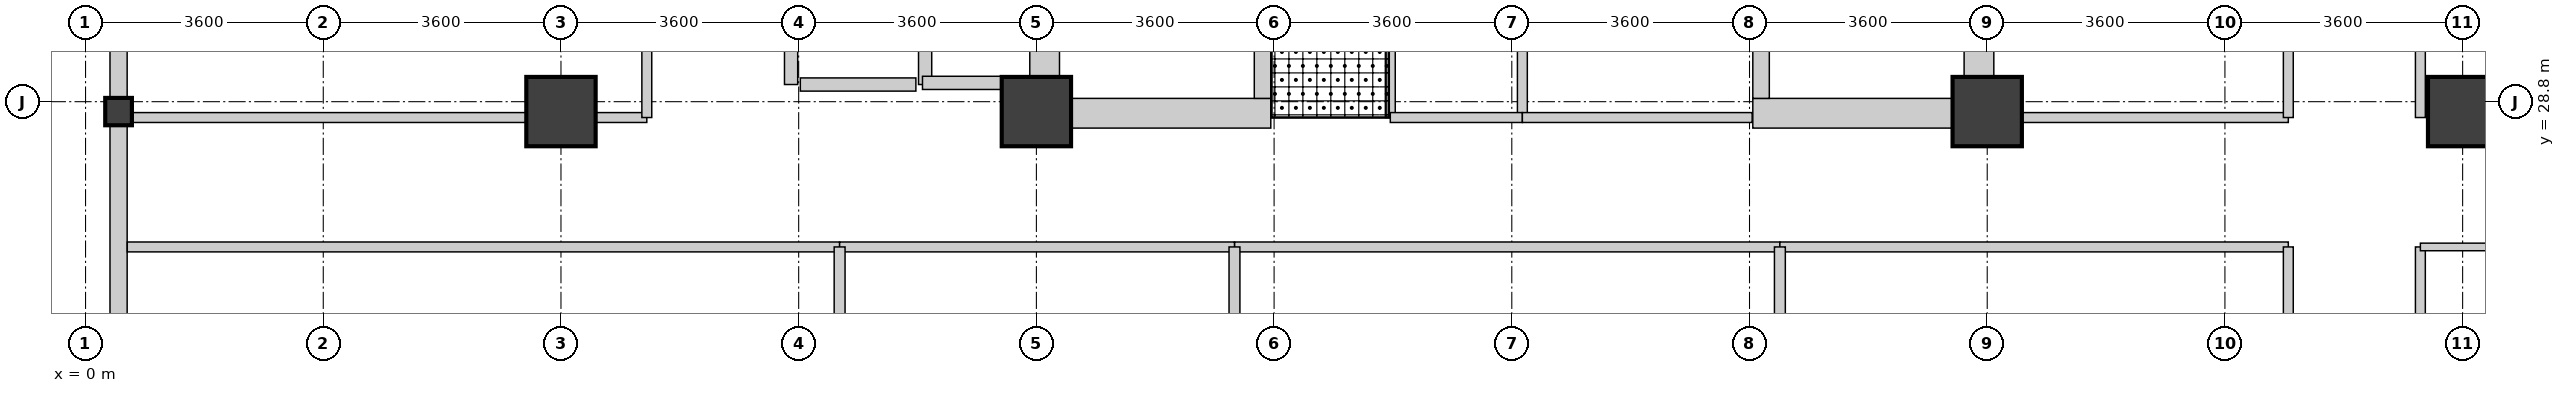
"""IFC4 building model, lengths in metres.
Left out: names, types, materials, properties, quantities, classifications, styles, units other than length and angle.
Written with IfcOpenShell. Run it as: python <this file> out.ifc"""

import sys

from ifc_helpers import new_model, si_unit, direction, frame, frame_2d, origin, origin_2d, place, context, subcontext, project, spatial, rectangle, i_section, extrude, source, transform, mapped, element, fill, save


model = new_model("IFC4")
c1 = context("Model", 3, precision=1e-05, world=origin(), true_north=direction((0.0, 1.0)))
c2 = subcontext(c1, "Body", "Model", "MODEL_VIEW")
j1 = project(units=[si_unit("LENGTHUNIT", "METRE"), si_unit("PLANEANGLEUNIT", "RADIAN")], contexts=[c1])
p1 = place(None, origin())
s1 = spatial("IfcSite", under=j1, at=p1, CompositionType="ELEMENT")
p2 = place(p1, origin())
s2 = spatial("IfcBuilding", under=s1, at=p2, CompositionType="ELEMENT")
p3 = place(p2, frame((0.0, 0.0, 135.6)))
s3 = spatial("IfcBuildingStorey", under=s2, at=p3, CompositionType="ELEMENT", Elevation=135.6)
for number, where, z_axis, x_axis in (
    (1, (14.525, 28.4, 0.0), (0.0, 0.0, 1.0), (0.0, 1.0, 0.0)),
    (2, (28.675, 28.4, 0.0), (0.0, 0.0, 1.0), (0.0, 1.0, 0.0)),
):
    element("IfcWall", number, at=place(p3, frame(where, z_axis=z_axis, x_axis=x_axis)), inside=s3, PredefinedType="SHEAR", context=c2, shape_type="SweptSolid", body=[
        extrude(rectangle(XDim=7.9, YDim=0.45, at=frame_2d((3.95, 0.0))), origin(), (0.0, 0.0, 1.0), 4.36),
    ])
for number, where, z_axis, x_axis in (
    (3, (14.75, 28.625, 0.0), (0.0, 0.0, 1.0), (1.0, 0.0, 0.0)),
    (4, (25.25, 28.625, 0.0), (0.0, 0.0, 1.0), (1.0, 0.0, 0.0)),
):
    element("IfcWall", number, at=place(p3, frame(where, z_axis=z_axis, x_axis=x_axis)), inside=s3, PredefinedType="SHEAR", context=c2, shape_type="SweptSolid", body=[
        extrude(rectangle(XDim=3.2, YDim=0.45, at=frame_2d((1.6, 0.0))), origin(), (0.0, 0.0, 1.0), 4.36),
    ])
p4 = place(p3, frame((17.825, 28.85, 0.0), z_axis=(0.0, 0.0, 1.0), x_axis=(0.0, 1.0, 0.0)))
e5 = element("IfcWall", 5, at=p4, inside=s3, PredefinedType="SHEAR", context=c2, shape_type="SweptSolid", body=[
    extrude(rectangle(XDim=7.0, YDim=0.25, at=frame_2d((3.5, 0.0))), origin(), (0.0, 0.0, 1.0), 4.36),
])
p5 = place(p4, frame((0.15, 0.0, 0.0)))
e6 = element("IfcOpeningElement", 6, at=p5, cuts=e5, PredefinedType="OPENING", context=c2, shape_type="SweptSolid", body=[
    extrude(rectangle(XDim=1.1, YDim=2.08, at=frame_2d((0.55, 1.04))), frame((0.0, 0.135, 0.0), z_axis=(0.0, -1.0, 0.0), x_axis=(1.0, 0.0, 0.0)), (0.0, 0.0, 1.0), 0.27),
])
p6 = place(p3, frame((25.375, 28.85, 0.0), z_axis=(0.0, 0.0, 1.0), x_axis=(0.0, 1.0, 0.0)))
e7 = element("IfcWall", 7, at=p6, inside=s3, PredefinedType="SHEAR", context=c2, shape_type="SweptSolid", body=[
    extrude(rectangle(XDim=7.0, YDim=0.25, at=frame_2d((3.5, 0.0))), origin(), (0.0, 0.0, 1.0), 4.36),
])
p7 = place(p6, frame((0.15, 0.0, 0.0)))
e8 = element("IfcOpeningElement", 8, at=p7, cuts=e7, PredefinedType="OPENING", context=c2, shape_type="SweptSolid", body=[
    extrude(rectangle(XDim=1.1, YDim=2.08, at=frame_2d((0.55, 1.04))), frame((0.0, 0.135, 0.0), z_axis=(0.0, -1.0, 0.0), x_axis=(1.0, 0.0, 0.0)), (0.0, 0.0, 1.0), 0.27),
])
m1 = source(origin(), c2, "Body", "SweptSolid", [
    extrude(rectangle(XDim=1.05, YDim=1.05, at=origin_2d()), origin(), (0.0, 0.0, 1.0), 4.6),
])
for number, where, z_axis, x_axis in (
    (9, (7.2, 28.65, 0.0), (0.0, 0.0, 1.0), (1.0, 0.0, 0.0)),
    (10, (14.4, 28.65, 0.0), (0.0, 0.0, 1.0), (1.0, 0.0, 0.0)),
    (11, (28.8, 28.65, 0.0), (0.0, 0.0, 1.0), (1.0, 0.0, 0.0)),
    (12, (36.0, 28.65, 0.0), (0.0, 0.0, 1.0), (1.0, 0.0, 0.0)),
):
    element("IfcColumn", number, at=place(p3, frame(where, z_axis=z_axis, x_axis=x_axis)), inside=s3, PredefinedType="COLUMN", context=c2, shape_type="MappedRepresentation", body=[
        mapped(m1, transform((0.0, 0.0, 0.0), x_axis=(1.0, 0.0, 0.0), y_axis=(0.0, 1.0, 0.0), z_axis=(0.0, 0.0, 1.0), scale=1.0)),
    ])
m2 = source(origin(), c2, "Body", "SweptSolid", [
    extrude(i_section(OverallWidth=0.404, OverallDepth=0.414, WebThickness=0.021, FlangeThickness=0.028, FilletRadius=0.015, at=origin_2d()), origin(), (0.0, 0.0, 1.0), 4.6),
])
p8 = place(p3, frame((0.5, 28.65, 0.0), z_axis=(0.0, 0.0, 1.0), x_axis=(1.0, 0.0, 0.0)))
e13 = element("IfcColumn", 13, at=p8, inside=s3, PredefinedType="COLUMN", context=c2, shape_type="MappedRepresentation", body=[
    mapped(m2, transform((0.0, 0.0, 0.0), x_axis=(1.0, 0.0, 0.0), y_axis=(0.0, 1.0, 0.0), z_axis=(0.0, 0.0, 1.0), scale=1.0)),
])
p9 = place(p3, frame((0.5, 28.858, 0.0), z_axis=(0.0, 0.0, 1.0), x_axis=(0.0, 1.0, 0.0)))
e14 = element("IfcWall", 14, at=p9, inside=s3, PredefinedType="STANDARD", context=c2, shape_type="SweptSolid", body=[
    extrude(rectangle(XDim=7.084, YDim=0.26, at=frame_2d((3.542, 0.0))), origin(), (0.0, 0.0, 1.0), 3.89),
])
p10 = place(p9, frame((0.421, 0.0, 0.85)))
e15 = element("IfcOpeningElement", 15, at=p10, cuts=e14, PredefinedType="OPENING", context=c2, shape_type="SweptSolid", body=[
    extrude(rectangle(XDim=2.7, YDim=2.05, at=frame_2d((1.35, 1.025))), frame((0.0, 0.14, 0.0), z_axis=(0.0, -1.0, 0.0), x_axis=(1.0, 0.0, 0.0)), (0.0, 0.0, 1.0), 0.28),
])
p11 = place(p9, frame((3.963, 0.0, 0.85)))
e16 = element("IfcOpeningElement", 16, at=p11, cuts=e14, PredefinedType="OPENING", context=c2, shape_type="SweptSolid", body=[
    extrude(rectangle(XDim=2.7, YDim=2.05, at=frame_2d((1.35, 1.025))), frame((0.0, 0.14, 0.0), z_axis=(0.0, -1.0, 0.0), x_axis=(1.0, 0.0, 0.0)), (0.0, 0.0, 1.0), 0.28),
])
p12 = place(p3, frame((0.5, 21.47, 0.0), z_axis=(0.0, 0.0, 1.0), x_axis=(0.0, 1.0, 0.0)))
e17 = element("IfcWall", 17, at=p12, inside=s3, PredefinedType="STANDARD", context=c2, shape_type="SweptSolid", body=[
    extrude(rectangle(XDim=6.972, YDim=0.26, at=frame_2d((3.486, 0.0))), origin(), (0.0, 0.0, 1.0), 4.34),
])
p13 = place(p12, frame((0.393, 0.0, 0.85)))
e18 = element("IfcOpeningElement", 18, at=p13, cuts=e17, PredefinedType="OPENING", context=c2, shape_type="SweptSolid", body=[
    extrude(rectangle(XDim=2.7, YDim=2.05, at=frame_2d((1.35, 1.025))), frame((0.0, 0.14, 0.0), z_axis=(0.0, -1.0, 0.0), x_axis=(1.0, 0.0, 0.0)), (0.0, 0.0, 1.0), 0.28),
])
p14 = place(p12, frame((3.569, 0.0, 0.85)))
e19 = element("IfcOpeningElement", 19, at=p14, cuts=e17, PredefinedType="OPENING", context=c2, shape_type="SweptSolid", body=[
    extrude(rectangle(XDim=0.95, YDim=1.75, at=frame_2d((0.475, 0.875))), frame((0.0, 0.14, 0.0), z_axis=(0.0, -1.0, 0.0), x_axis=(1.0, 0.0, 0.0)), (0.0, 0.0, 1.0), 0.28),
])
p15 = place(p3, frame((10.825, 29.06, 0.0), z_axis=(0.0, 0.0, 1.0), x_axis=(1.0, 0.0, 0.0)))
e20 = element("IfcWall", 20, at=p15, inside=s3, PredefinedType="PARTITIONING", context=c2, shape_type="SweptSolid", body=[
    extrude(rectangle(XDim=1.75, YDim=0.2, at=frame_2d((0.875, 0.0))), origin(), (0.0, 0.0, 1.0), 4.34),
])
for number, where, z_axis, x_axis in (
    (21, (10.685, 29.06, 0.0), (0.0, 0.0, 1.0), (0.0, 1.0, 0.0)),
    (22, (12.715, 29.06, 0.0), (0.0, 0.0, 1.0), (0.0, 1.0, 0.0)),
):
    element("IfcWall", number, at=place(p3, frame(where, z_axis=z_axis, x_axis=x_axis)), inside=s3, PredefinedType="PARTITIONING", context=c2, shape_type="SweptSolid", body=[
        extrude(rectangle(XDim=2.28, YDim=0.2, at=frame_2d((1.14, 0.0))), origin(), (0.0, 0.0, 1.0), 4.34),
    ])
p16 = place(p3, frame((12.675, 29.085, 0.0), z_axis=(0.0, 0.0, 1.0), x_axis=(1.0, 0.0, 0.0)))
e23 = element("IfcWall", 23, at=p16, inside=s3, PredefinedType="PARTITIONING", context=c2, shape_type="SweptSolid", body=[
    extrude(rectangle(XDim=1.65, YDim=0.2, at=frame_2d((0.825, 0.0))), origin(), (0.0, 0.0, 1.0), 4.34),
])
p17 = place(p3, frame((0.632, 26.6, 0.0), z_axis=(0.0, 0.0, 1.0), x_axis=(1.0, 0.0, 0.0)))
e24 = element("IfcWall", 24, at=p17, inside=s3, PredefinedType="PARTITIONING", context=c2, shape_type="SweptSolid", body=[
    extrude(rectangle(XDim=10.788, YDim=0.15, at=frame_2d((5.394, 0.0))), origin(), (0.0, 0.0, 1.0), 4.34),
])
p18 = place(p17, frame((4.744, 0.0, 0.0)))
e25 = element("IfcOpeningElement", 25, at=p18, cuts=e24, PredefinedType="OPENING", context=c2, shape_type="SweptSolid", body=[
    extrude(rectangle(XDim=1.3, YDim=2.12, at=frame_2d((0.65, 1.06))), frame((0.0, 0.085, 0.0), z_axis=(0.0, -1.0, 0.0), x_axis=(1.0, 0.0, 0.0)), (0.0, 0.0, 1.0), 0.17),
])
p19 = place(p3, frame((35.36, 16.96, 0.0), z_axis=(0.0, 0.0, 1.0), x_axis=(0.0, 1.0, 0.0)))
e26 = element("IfcWall", 26, at=p19, inside=s3, PredefinedType="PARTITIONING", context=c2, shape_type="SweptSolid", body=[
    extrude(rectangle(XDim=9.64, YDim=0.15, at=frame_2d((4.82, 0.0))), origin(), (0.0, 0.0, 1.0), 4.34),
])
p20 = place(p19, frame((2.435, 0.0, 0.0)))
e27 = element("IfcOpeningElement", 27, at=p20, cuts=e26, PredefinedType="OPENING", context=c2, shape_type="SweptSolid", body=[
    extrude(rectangle(XDim=1.3, YDim=2.12, at=frame_2d((0.65, 1.06))), frame((0.0, 0.085, 0.0), z_axis=(0.0, -1.0, 0.0), x_axis=(1.0, 0.0, 0.0)), (0.0, 0.0, 1.0), 0.17),
])
p21 = place(p3, frame((17.4, 26.6, 0.0), z_axis=(0.0, 0.0, 1.0), x_axis=(1.0, 0.0, 0.0)))
e28 = element("IfcWall", 28, at=p21, inside=s3, PredefinedType="PARTITIONING", context=c2, shape_type="SweptSolid", body=[
    extrude(rectangle(XDim=8.26, YDim=0.15, at=frame_2d((4.13, 0.0))), origin(), (0.0, 0.0, 1.0), 4.34),
])
p22 = place(p21, frame((3.655, 0.0, 0.0)))
e29 = element("IfcOpeningElement", 29, at=p22, cuts=e28, PredefinedType="OPENING", context=c2, shape_type="SweptSolid", body=[
    extrude(rectangle(XDim=0.95, YDim=2.1, at=frame_2d((0.475, 1.05))), frame((0.0, 0.085, 0.0), z_axis=(0.0, -1.0, 0.0), x_axis=(1.0, 0.0, 0.0)), (0.0, 0.0, 1.0), 0.17),
])
p23 = place(p3, frame((0.702, 28.56, 0.0), z_axis=(0.0, 0.0, 1.0), x_axis=(1.0, 0.0, 0.0)))
e30 = element("IfcWall", 30, at=p23, inside=s3, PredefinedType="PARTITIONING", context=c2, shape_type="SweptSolid", body=[
    extrude(rectangle(XDim=5.973, YDim=0.15, at=frame_2d((2.987, 0.0))), origin(), (0.0, 0.0, 1.0), 3.74),
])
p24 = place(p23, frame((2.336, 0.0, 0.0)))
e31 = element("IfcOpeningElement", 31, at=p24, cuts=e30, PredefinedType="OPENING", context=c2, shape_type="SweptSolid", body=[
    extrude(rectangle(XDim=1.3, YDim=2.12, at=frame_2d((0.65, 1.06))), frame((0.0, 0.085, 0.0), z_axis=(0.0, -1.0, 0.0), x_axis=(1.0, 0.0, 0.0)), (0.0, 0.0, 1.0), 0.17),
])
p25 = place(p3, frame((7.725, 28.56, 0.0), z_axis=(0.0, 0.0, 1.0), x_axis=(1.0, 0.0, 0.0)))
e32 = element("IfcWall", 32, at=p25, inside=s3, PredefinedType="PARTITIONING", context=c2, shape_type="SweptSolid", body=[
    extrude(rectangle(XDim=0.775, YDim=0.15, at=frame_2d((0.387, 0.0))), origin(), (0.0, 0.0, 1.0), 3.74),
])
p26 = place(p3, frame((25.66, 26.6, 0.0), z_axis=(0.0, 0.0, 1.0), x_axis=(1.0, 0.0, 0.0)))
e33 = element("IfcWall", 33, at=p26, inside=s3, PredefinedType="PARTITIONING", context=c2, shape_type="SweptSolid", body=[
    extrude(rectangle(XDim=7.7, YDim=0.15, at=frame_2d((3.85, 0.0))), origin(), (0.0, 0.0, 1.0), 4.34),
])
p27 = place(p26, frame((3.2, 0.0, 0.0)))
e34 = element("IfcOpeningElement", 34, at=p27, cuts=e33, PredefinedType="OPENING", context=c2, shape_type="SweptSolid", body=[
    extrude(rectangle(XDim=1.3, YDim=2.12, at=frame_2d((0.65, 1.06))), frame((0.0, 0.085, 0.0), z_axis=(0.0, -1.0, 0.0), x_axis=(1.0, 0.0, 0.0)), (0.0, 0.0, 1.0), 0.17),
])
p28 = place(p3, frame((35.36, 28.56, 0.0), z_axis=(0.0, 0.0, 1.0), x_axis=(0.0, 1.0, 0.0)))
e35 = element("IfcWall", 35, at=p28, inside=s3, PredefinedType="PARTITIONING", context=c2, shape_type="SweptSolid", body=[
    extrude(rectangle(XDim=7.68, YDim=0.15, at=frame_2d((3.84, 0.0))), origin(), (0.0, 0.0, 1.0), 4.34),
])
p29 = place(p28, frame((3.19, 0.0, 0.0)))
e36 = element("IfcOpeningElement", 36, at=p29, cuts=e35, PredefinedType="OPENING", context=c2, shape_type="SweptSolid", body=[
    extrude(rectangle(XDim=1.3, YDim=2.12, at=frame_2d((0.65, 1.06))), frame((0.0, 0.085, 0.0), z_axis=(0.0, -1.0, 0.0), x_axis=(1.0, 0.0, 0.0)), (0.0, 0.0, 1.0), 0.17),
])
p30 = place(p3, frame((11.42, 26.6, 0.0), z_axis=(0.0, 0.0, 1.0), x_axis=(1.0, 0.0, 0.0)))
e37 = element("IfcWall", 37, at=p30, inside=s3, PredefinedType="PARTITIONING", context=c2, shape_type="SweptSolid", body=[
    extrude(rectangle(XDim=5.98, YDim=0.15, at=frame_2d((2.99, 0.0))), origin(), (0.0, 0.0, 1.0), 4.34),
])
p31 = place(p30, frame((2.34, 0.0, 0.0)))
e38 = element("IfcOpeningElement", 38, at=p31, cuts=e37, PredefinedType="OPENING", context=c2, shape_type="SweptSolid", body=[
    extrude(rectangle(XDim=1.3, YDim=2.12, at=frame_2d((0.65, 1.06))), frame((0.0, 0.085, 0.0), z_axis=(0.0, -1.0, 0.0), x_axis=(1.0, 0.0, 0.0)), (0.0, 0.0, 1.0), 0.17),
])
p32 = place(p3, frame((33.36, 21.6, 0.0), z_axis=(0.0, 0.0, 1.0), x_axis=(0.0, 1.0, 0.0)))
e39 = element("IfcWall", 39, at=p32, inside=s3, PredefinedType="PARTITIONING", context=c2, shape_type="SweptSolid", body=[
    extrude(rectangle(XDim=5.0, YDim=0.15, at=frame_2d((2.5, 0.0))), origin(), (0.0, 0.0, 1.0), 4.34),
])
p33 = place(p3, frame((29.325, 28.56, 0.0), z_axis=(0.0, 0.0, 1.0), x_axis=(1.0, 0.0, 0.0)))
e40 = element("IfcWall", 40, at=p33, inside=s3, PredefinedType="PARTITIONING", context=c2, shape_type="SweptSolid", body=[
    extrude(rectangle(XDim=4.035, YDim=0.15, at=frame_2d((2.018, 0.0))), origin(), (0.0, 0.0, 1.0), 3.74),
])
p34 = place(p33, frame((1.587, 0.0, 0.0)))
e41 = element("IfcOpeningElement", 41, at=p34, cuts=e40, PredefinedType="OPENING", context=c2, shape_type="SweptSolid", body=[
    extrude(rectangle(XDim=0.86, YDim=2.02, at=frame_2d((0.43, 1.01))), frame((0.0, 0.085, 0.0), z_axis=(0.0, -1.0, 0.0), x_axis=(1.0, 0.0, 0.0)), (0.0, 0.0, 1.0), 0.17),
])
p35 = place(p3, frame((8.5, 28.56, 0.0), z_axis=(0.0, 0.0, 1.0), x_axis=(0.0, 1.0, 0.0)))
e42 = element("IfcWall", 42, at=p35, inside=s3, PredefinedType="PARTITIONING", context=c2, shape_type="SweptSolid", body=[
    extrude(rectangle(XDim=3.84, YDim=0.15, at=frame_2d((1.92, 0.0))), origin(), (0.0, 0.0, 1.0), 4.34),
])
p36 = place(p3, frame((33.36, 28.56, 0.0), z_axis=(0.0, 0.0, 1.0), x_axis=(0.0, 1.0, 0.0)))
e43 = element("IfcWall", 43, at=p36, inside=s3, PredefinedType="PARTITIONING", context=c2, shape_type="SweptSolid", body=[
    extrude(rectangle(XDim=3.08, YDim=0.15, at=frame_2d((1.54, 0.0))), origin(), (0.0, 0.0, 1.0), 4.34),
])
p37 = place(p3, frame((19.76, 28.56, 0.0), z_axis=(0.0, 0.0, 1.0), x_axis=(0.0, 1.0, 0.0)))
e44 = element("IfcWall", 44, at=p37, inside=s3, PredefinedType="PARTITIONING", context=c2, shape_type="SweptSolid", body=[
    extrude(rectangle(XDim=2.68, YDim=0.15, at=frame_2d((1.34, 0.0))), origin(), (0.0, 0.0, 1.0), 4.34),
])
p38 = place(p37, frame((0.91, 0.0, 0.0)))
e45 = element("IfcOpeningElement", 45, at=p38, cuts=e44, PredefinedType="OPENING", context=c2, shape_type="SweptSolid", body=[
    extrude(rectangle(XDim=0.86, YDim=2.02, at=frame_2d((0.43, 1.01))), frame((0.0, 0.085, 0.0), z_axis=(0.0, -1.0, 0.0), x_axis=(1.0, 0.0, 0.0)), (0.0, 0.0, 1.0), 0.17),
])
p39 = place(p3, frame((21.76, 28.56, 0.0), z_axis=(0.0, 0.0, 1.0), x_axis=(0.0, 1.0, 0.0)))
e46 = element("IfcWall", 46, at=p39, inside=s3, PredefinedType="PARTITIONING", context=c2, shape_type="SweptSolid", body=[
    extrude(rectangle(XDim=2.68, YDim=0.15, at=frame_2d((1.34, 0.0))), origin(), (0.0, 0.0, 1.0), 4.34),
])
p40 = place(p3, frame((19.76, 28.56, 0.0), z_axis=(0.0, 0.0, 1.0), x_axis=(1.0, 0.0, 0.0)))
e47 = element("IfcWall", 47, at=p40, inside=s3, PredefinedType="PARTITIONING", context=c2, shape_type="SweptSolid", body=[
    extrude(rectangle(XDim=2.0, YDim=0.15, at=frame_2d((1.0, 0.0))), origin(), (0.0, 0.0, 1.0), 3.34),
])
p41 = place(p3, frame((35.36, 26.6, 0.0), z_axis=(0.0, 0.0, 1.0), x_axis=(1.0, 0.0, 0.0)))
e48 = element("IfcWall", 48, at=p41, inside=s3, PredefinedType="PARTITIONING", context=c2, shape_type="SweptSolid", body=[
    extrude(rectangle(XDim=5.82, YDim=0.115, at=frame_2d((2.91, 0.0))), origin(), (0.0, 0.0, 1.0), 4.34),
])
for number, where, z_axis, x_axis in (
    (49, (11.42, 21.732, 0.0), (0.0, 0.0, 1.0), (0.0, 1.0, 0.0)),
    (50, (17.4, 21.732, 0.0), (0.0, 0.0, 1.0), (0.0, 1.0, 0.0)),
    (51, (25.66, 21.732, 0.0), (0.0, 0.0, 1.0), (0.0, 1.0, 0.0)),
):
    element("IfcWall", number, at=place(p3, frame(where, z_axis=z_axis, x_axis=x_axis)), inside=s3, PredefinedType="PARTITIONING", context=c2, shape_type="SweptSolid", body=[
        extrude(rectangle(XDim=4.868, YDim=0.165, at=frame_2d((2.434, 0.0))), origin(), (0.0, 0.0, 1.0), 4.34),
    ])
p42 = place(p3, frame((21.76, 28.56, 0.0), z_axis=(0.0, 0.0, 1.0), x_axis=(1.0, 0.0, 0.0)))
e52 = element("IfcWall", 52, at=p42, inside=s3, PredefinedType="PARTITIONING", context=c2, shape_type="SweptSolid", body=[
    extrude(rectangle(XDim=3.48, YDim=0.15, at=frame_2d((1.74, 0.0))), origin(), (0.0, 0.0, 1.0), 3.34),
])
p43 = place(p42, frame((0.99, 0.0, 0.0)))
e53 = element("IfcOpeningElement", 53, at=p43, cuts=e52, PredefinedType="OPENING", context=c2, shape_type="SweptSolid", body=[
    extrude(rectangle(XDim=1.5, YDim=2.1, at=frame_2d((0.75, 1.05))), frame((0.0, 0.085, 0.0), z_axis=(0.0, -1.0, 0.0), x_axis=(1.0, 0.0, 0.0)), (0.0, 0.0, 1.0), 0.17),
])
p44 = place(p10, origin())
e54 = element("IfcWindow", 54, at=p44, inside=s3, PartitioningType="SINGLE_PANEL", PredefinedType="WINDOW", context=c2, shape_type="SweptSolid", body=[
    extrude(rectangle(XDim=2.7, YDim=2.05, at=frame_2d((1.35, 1.025))), frame((0.0, 0.03, 0.0), z_axis=(0.0, -1.0, 0.0), x_axis=(1.0, 0.0, 0.0)), (0.0, 0.0, 1.0), 0.06),
])
fill(e15, e54)
p45 = place(p14, origin())
e55 = element("IfcWindow", 55, at=p45, inside=s3, PartitioningType="SINGLE_PANEL", PredefinedType="WINDOW", context=c2, shape_type="SweptSolid", body=[
    extrude(rectangle(XDim=0.95, YDim=1.75, at=frame_2d((0.475, 0.875))), frame((0.0, 0.03, 0.0), z_axis=(0.0, -1.0, 0.0), x_axis=(1.0, 0.0, 0.0)), (0.0, 0.0, 1.0), 0.06),
])
fill(e19, e55)
p46 = place(p5, origin())
e56 = element("IfcDoor", 56, at=p46, inside=s3, OperationType="SINGLE_SWING_RIGHT", PredefinedType="DOOR", context=c2, shape_type="SweptSolid", body=[
    extrude(rectangle(XDim=1.1, YDim=2.08, at=frame_2d((0.55, 1.04))), frame((0.0, 0.025, 0.0), z_axis=(0.0, -1.0, 0.0), x_axis=(1.0, 0.0, 0.0)), (0.0, 0.0, 1.0), 0.05),
])
fill(e6, e56)
p47 = place(p7, origin())
e57 = element("IfcDoor", 57, at=p47, inside=s3, OperationType="SINGLE_SWING_LEFT", PredefinedType="DOOR", context=c2, shape_type="SweptSolid", body=[
    extrude(rectangle(XDim=1.1, YDim=2.08, at=frame_2d((0.55, 1.04))), frame((0.0, 0.025, 0.0), z_axis=(0.0, -1.0, 0.0), x_axis=(1.0, 0.0, 0.0)), (0.0, 0.0, 1.0), 0.05),
])
fill(e8, e57)
p48 = place(p18, origin())
e58 = element("IfcDoor", 58, at=p48, inside=s3, OperationType="DOUBLE_DOOR_SINGLE_SWING", PredefinedType="DOOR", context=c2, shape_type="SweptSolid", body=[
    extrude(rectangle(XDim=1.3, YDim=2.12, at=frame_2d((0.65, 1.06))), frame((0.0, 0.025, 0.0), z_axis=(0.0, -1.0, 0.0), x_axis=(1.0, 0.0, 0.0)), (0.0, 0.0, 1.0), 0.05),
])
fill(e25, e58)
p49 = place(p22, origin())
e59 = element("IfcDoor", 59, at=p49, inside=s3, OperationType="SINGLE_SWING_LEFT", PredefinedType="DOOR", context=c2, shape_type="SweptSolid", body=[
    extrude(rectangle(XDim=0.95, YDim=2.1, at=frame_2d((0.475, 1.05))), frame((0.0, 0.025, 0.0), z_axis=(0.0, -1.0, 0.0), x_axis=(1.0, 0.0, 0.0)), (0.0, 0.0, 1.0), 0.05),
])
fill(e29, e59)
p50 = place(p24, origin())
e60 = element("IfcDoor", 60, at=p50, inside=s3, OperationType="DOUBLE_DOOR_SINGLE_SWING", PredefinedType="DOOR", context=c2, shape_type="SweptSolid", body=[
    extrude(rectangle(XDim=1.3, YDim=2.12, at=frame_2d((0.65, 1.06))), frame((0.0, 0.025, 0.0), z_axis=(0.0, -1.0, 0.0), x_axis=(1.0, 0.0, 0.0)), (0.0, 0.0, 1.0), 0.05),
])
fill(e31, e60)
p51 = place(p27, origin())
e61 = element("IfcDoor", 61, at=p51, inside=s3, OperationType="DOUBLE_DOOR_SINGLE_SWING", PredefinedType="DOOR", context=c2, shape_type="SweptSolid", body=[
    extrude(rectangle(XDim=1.3, YDim=2.12, at=frame_2d((0.65, 1.06))), frame((0.0, 0.025, 0.0), z_axis=(0.0, -1.0, 0.0), x_axis=(1.0, 0.0, 0.0)), (0.0, 0.0, 1.0), 0.05),
])
fill(e34, e61)
p52 = place(p31, origin())
e62 = element("IfcDoor", 62, at=p52, inside=s3, OperationType="DOUBLE_DOOR_SINGLE_SWING", PredefinedType="DOOR", context=c2, shape_type="SweptSolid", body=[
    extrude(rectangle(XDim=1.3, YDim=2.12, at=frame_2d((0.65, 1.06))), frame((0.0, 0.025, 0.0), z_axis=(0.0, -1.0, 0.0), x_axis=(1.0, 0.0, 0.0)), (0.0, 0.0, 1.0), 0.05),
])
fill(e38, e62)
p53 = place(p34, origin())
e63 = element("IfcDoor", 63, at=p53, inside=s3, OperationType="SINGLE_SWING_RIGHT", PredefinedType="DOOR", context=c2, shape_type="SweptSolid", body=[
    extrude(rectangle(XDim=0.86, YDim=2.02, at=frame_2d((0.43, 1.01))), frame((0.0, 0.025, 0.0), z_axis=(0.0, -1.0, 0.0), x_axis=(1.0, 0.0, 0.0)), (0.0, 0.0, 1.0), 0.05),
])
fill(e41, e63)
p54 = place(p38, origin())
e64 = element("IfcDoor", 64, at=p54, inside=s3, OperationType="SINGLE_SWING_LEFT", PredefinedType="DOOR", context=c2, shape_type="SweptSolid", body=[
    extrude(rectangle(XDim=0.86, YDim=2.02, at=frame_2d((0.43, 1.01))), frame((0.0, 0.025, 0.0), z_axis=(0.0, -1.0, 0.0), x_axis=(1.0, 0.0, 0.0)), (0.0, 0.0, 1.0), 0.05),
])
fill(e45, e64)
p55 = place(p43, origin())
e65 = element("IfcDoor", 65, at=p55, inside=s3, OperationType="DOUBLE_DOOR_SINGLE_SWING", PredefinedType="DOOR", context=c2, shape_type="SweptSolid", body=[
    extrude(rectangle(XDim=1.5, YDim=2.1, at=frame_2d((0.75, 1.05))), frame((0.0, 0.025, 0.0), z_axis=(0.0, -1.0, 0.0), x_axis=(1.0, 0.0, 0.0)), (0.0, 0.0, 1.0), 0.05),
])
fill(e53, e65)
save(model, sys.argv[1])
